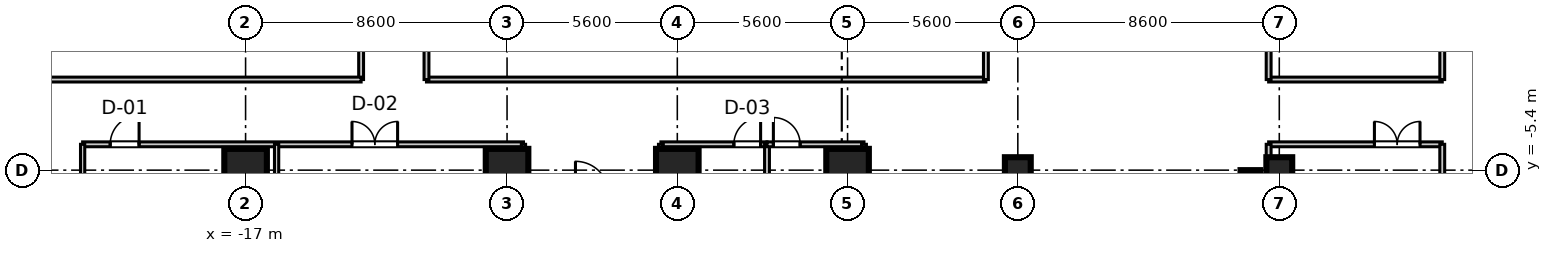
"""IFC4 building model, lengths in metres.
Left out: names, types, materials, properties, quantities, classifications, styles, units other than length and angle.
Written with IfcOpenShell. Run it as: python <this file> out.ifc"""

import sys

from ifc_helpers import new_model, si_unit, direction, frame, frame_2d, origin, origin_2d, place, context, subcontext, project, spatial, rectangle, extrude, source, transform, mapped, element, fill, save


model = new_model("IFC4")
c1 = context("Model", 3, precision=1e-05, world=origin(), true_north=direction((0.0, 1.0)))
c2 = subcontext(c1, "Body", "Model", "MODEL_VIEW")
j1 = project(units=[si_unit("LENGTHUNIT", "METRE"), si_unit("PLANEANGLEUNIT", "RADIAN")], contexts=[c1])
p1 = place(None, origin())
s1 = spatial("IfcSite", under=j1, at=p1, CompositionType="ELEMENT")
p2 = place(p1, origin())
s2 = spatial("IfcBuilding", under=s1, at=p2, CompositionType="ELEMENT")
p3 = place(p2, frame((0.0, 0.0, 39.7)))
s3 = spatial("IfcBuildingStorey", under=s2, at=p3, CompositionType="ELEMENT", Elevation=39.7)
m1 = source(origin(), c2, "Body", "SweptSolid", [
    extrude(rectangle(XDim=1.4, YDim=1.4, at=origin_2d()), origin(), (0.0, 0.0, 1.0), 3.605),
])
for number, where, z_axis, x_axis in (
    (1, (-17.0, -5.4, 0.0), (0.0, 0.0, 1.0), (1.0, 0.0, 0.0)),
    (2, (-8.4, -5.4, 0.0), (0.0, 0.0, 1.0), (1.0, 0.0, 0.0)),
    (3, (-2.8, -5.4, 0.0), (0.0, 0.0, 1.0), (1.0, 0.0, 0.0)),
    (4, (2.8, -5.4, 0.0), (0.0, 0.0, 1.0), (1.0, 0.0, 0.0)),
):
    element("IfcColumn", number, at=place(p3, frame(where, z_axis=z_axis, x_axis=x_axis)), inside=s3, PredefinedType="COLUMN", context=c2, shape_type="MappedRepresentation", body=[
        mapped(m1, transform((0.0, 0.0, 0.0), scale=1.0)),
    ])
m2 = source(origin(), c2, "Body", "SweptSolid", [
    extrude(rectangle(XDim=0.85, YDim=0.85, at=origin_2d()), origin(), (0.0, 0.0, 1.0), 3.605),
])
for number, where, z_axis, x_axis in (
    (5, (8.4, -5.4, 0.0), (0.0, 0.0, 1.0), (1.0, 0.0, 0.0)),
    (6, (17.0, -5.4, 0.0), (0.0, 0.0, 1.0), (1.0, 0.0, 0.0)),
):
    element("IfcColumn", number, at=place(p3, frame(where, z_axis=z_axis, x_axis=x_axis)), inside=s3, PredefinedType="PILASTER", context=c2, shape_type="MappedRepresentation", body=[
        mapped(m2, transform((0.0, 0.0, 0.0), scale=1.0)),
    ])
m3 = source(origin(), c2, "Body", "SweptSolid", [
    extrude(rectangle(XDim=11.6, YDim=0.65, at=frame_2d((5.8, 0.0))), origin(), (0.0, 0.0, 1.0), 3.37),
])
p4 = place(p3, frame((16.05, -17.0, 0.0), z_axis=(0.0, 0.0, 1.0), x_axis=(0.0, 1.0, 0.0)))
e7 = element("IfcWall", 7, at=p4, inside=s3, PredefinedType="SHEAR", context=c2, shape_type="MappedRepresentation", body=[
    mapped(m3, transform((0.0, 0.0, 0.0), scale=1.0)),
])
m4 = source(origin(), c2, "Body", "SweptSolid", [
    extrude(rectangle(XDim=5.71, YDim=0.16, at=frame_2d((2.855, 0.0))), origin(), (0.0, 0.0, 1.0), 2.71),
])
p5 = place(p3, frame((16.65, -4.55, 0.0), z_axis=(0.0, 0.0, 1.0), x_axis=(1.0, 0.0, 0.0)))
e8 = element("IfcWall", 8, at=p5, inside=s3, PredefinedType="PARTITIONING", context=c2, shape_type="MappedRepresentation", body=[
    mapped(m4, transform((0.0, 0.0, 0.0), scale=1.0)),
])
p6 = place(p5, frame((3.479, 0.0, 0.0)))
e9 = element("IfcOpeningElement", 9, at=p6, cuts=e8, PredefinedType="OPENING", context=c2, shape_type="SweptSolid", body=[
    extrude(rectangle(XDim=1.5, YDim=2.15, at=frame_2d((0.75, 1.075))), frame((0.0, 0.09, 0.0), z_axis=(0.0, -1.0, 0.0), x_axis=(1.0, 0.0, 0.0)), (0.0, 0.0, 1.0), 0.18),
])
m5 = source(origin(), c2, "Body", "SweptSolid", [
    extrude(rectangle(XDim=20.55, YDim=0.16, at=frame_2d((10.275, 0.0))), origin(), (0.0, 0.0, 1.0), 2.71),
])
p7 = place(p3, frame((16.65, -25.1, 0.0), z_axis=(0.0, 0.0, 1.0), x_axis=(0.0, 1.0, 0.0)))
e10 = element("IfcWall", 10, at=p7, inside=s3, PredefinedType="PARTITIONING", context=c2, shape_type="MappedRepresentation", body=[
    mapped(m5, transform((0.0, 0.0, 0.0), scale=1.0)),
])
m6 = source(origin(), c2, "Body", "SweptSolid", [
    extrude(rectangle(XDim=19.13, YDim=0.16, at=frame_2d((9.565, 0.0))), origin(), (0.0, 0.0, 1.0), 2.71),
])
p8 = place(p3, frame((22.36, -23.68, 0.0), z_axis=(0.0, 0.0, 1.0), x_axis=(0.0, 1.0, 0.0)))
e11 = element("IfcWall", 11, at=p8, inside=s3, PredefinedType="PARTITIONING", context=c2, shape_type="MappedRepresentation", body=[
    mapped(m6, transform((0.0, 0.0, 0.0), scale=1.0)),
])
m7 = source(origin(), c2, "Body", "SweptSolid", [
    extrude(rectangle(XDim=14.5, YDim=0.16, at=frame_2d((7.25, 0.0))), origin(), (0.0, 0.0, 1.0), 2.71),
])
p9 = place(p3, frame((-22.36, -4.55, 0.0), z_axis=(0.0, 0.0, 1.0), x_axis=(1.0, 0.0, 0.0)))
e12 = element("IfcWall", 12, at=p9, inside=s3, PredefinedType="PARTITIONING", context=c2, shape_type="MappedRepresentation", body=[
    mapped(m7, transform((0.0, 0.0, 0.0), scale=1.0)),
])
p10 = place(p9, frame((0.907, 0.0, 0.0)))
e13 = element("IfcOpeningElement", 13, at=p10, cuts=e12, PredefinedType="OPENING", context=c2, shape_type="SweptSolid", body=[
    extrude(rectangle(XDim=0.95, YDim=2.1, at=frame_2d((0.475, 1.05))), frame((0.0, 0.09, 0.0), z_axis=(0.0, -1.0, 0.0), x_axis=(1.0, 0.0, 0.0)), (0.0, 0.0, 1.0), 0.18),
])
p11 = place(p9, frame((8.86, 0.0, 0.0)))
e14 = element("IfcOpeningElement", 14, at=p11, cuts=e12, PredefinedType="OPENING", context=c2, shape_type="SweptSolid", body=[
    extrude(rectangle(XDim=1.5, YDim=2.15, at=frame_2d((0.75, 1.075))), frame((0.0, 0.09, 0.0), z_axis=(0.0, -1.0, 0.0), x_axis=(1.0, 0.0, 0.0)), (0.0, 0.0, 1.0), 0.18),
])
m8 = source(origin(), c2, "Body", "SweptSolid", [
    extrude(rectangle(XDim=19.13, YDim=0.14, at=frame_2d((9.565, 0.0))), origin(), (0.0, 0.0, 1.0), 2.71),
])
p12 = place(p3, frame((-22.36, -23.68, 0.0), z_axis=(0.0, 0.0, 1.0), x_axis=(0.0, 1.0, 0.0)))
e15 = element("IfcWall", 15, at=p12, inside=s3, PredefinedType="PARTITIONING", context=c2, shape_type="MappedRepresentation", body=[
    mapped(m8, transform((0.0, 0.0, 0.0), scale=1.0)),
])
m9 = source(origin(), c2, "Body", "SweptSolid", [
    extrude(rectangle(XDim=20.55, YDim=0.14, at=frame_2d((10.275, 0.0))), origin(), (0.0, 0.0, 1.0), 2.71),
])
for number, where, z_axis, x_axis in (
    (16, (-7.86, -25.1, 0.0), (0.0, 0.0, 1.0), (0.0, 1.0, 0.0)),
    (17, (-15.98, -25.1, 0.0), (0.0, 0.0, 1.0), (0.0, 1.0, 0.0)),
):
    element("IfcWall", number, at=place(p3, frame(where, z_axis=z_axis, x_axis=x_axis)), inside=s3, PredefinedType="PARTITIONING", context=c2, shape_type="MappedRepresentation", body=[
        mapped(m9, transform((0.0, 0.0, 0.0), scale=1.0)),
    ])
m10 = source(origin(), c2, "Body", "SweptSolid", [
    extrude(rectangle(XDim=3.49, YDim=0.16, at=frame_2d((1.745, 0.0))), origin(), (0.0, 0.0, 1.0), 2.71),
])
p13 = place(p3, frame((-3.34, -4.55, 0.0), z_axis=(0.0, 0.0, 1.0), x_axis=(1.0, 0.0, 0.0)))
e18 = element("IfcWall", 18, at=p13, inside=s3, PredefinedType="PARTITIONING", context=c2, shape_type="MappedRepresentation", body=[
    mapped(m10, transform((0.0, 0.0, 0.0), scale=1.0)),
])
p14 = place(p13, frame((2.4, 0.0, 0.0)))
e19 = element("IfcOpeningElement", 19, at=p14, cuts=e18, PredefinedType="OPENING", context=c2, shape_type="SweptSolid", body=[
    extrude(rectangle(XDim=0.88, YDim=2.1, at=frame_2d((0.44, 1.05))), frame((0.0, 0.09, 0.0), z_axis=(0.0, -1.0, 0.0), x_axis=(1.0, 0.0, 0.0)), (0.0, 0.0, 1.0), 0.18),
])
for number, where, z_axis, x_axis in (
    (20, (-3.34, -25.1, 0.0), (0.0, 0.0, 1.0), (0.0, 1.0, 0.0)),
    (21, (0.15, -25.1, 0.0), (0.0, 0.0, 1.0), (0.0, 1.0, 0.0)),
):
    element("IfcWall", number, at=place(p3, frame(where, z_axis=z_axis, x_axis=x_axis)), inside=s3, PredefinedType="PARTITIONING", context=c2, shape_type="MappedRepresentation", body=[
        mapped(m5, transform((0.0, 0.0, 0.0), scale=1.0)),
    ])
m11 = source(origin(), c2, "Body", "SweptSolid", [
    extrude(rectangle(XDim=3.19, YDim=0.16, at=frame_2d((1.595, 0.0))), origin(), (0.0, 0.0, 1.0), 2.71),
])
p15 = place(p3, frame((0.15, -4.55, 0.0), z_axis=(0.0, 0.0, 1.0), x_axis=(1.0, 0.0, 0.0)))
e22 = element("IfcWall", 22, at=p15, inside=s3, PredefinedType="PARTITIONING", context=c2, shape_type="MappedRepresentation", body=[
    mapped(m11, transform((0.0, 0.0, 0.0), scale=1.0)),
])
p16 = place(p15, frame((0.21, 0.0, 0.0)))
e23 = element("IfcOpeningElement", 23, at=p16, cuts=e22, PredefinedType="OPENING", context=c2, shape_type="SweptSolid", body=[
    extrude(rectangle(XDim=0.88, YDim=2.1, at=frame_2d((0.44, 1.05))), frame((0.0, 0.09, 0.0), z_axis=(0.0, -1.0, 0.0), x_axis=(1.0, 0.0, 0.0)), (0.0, 0.0, 1.0), 0.18),
])
p17 = place(p3, frame((3.34, -25.1, 0.0), z_axis=(0.0, 0.0, 1.0), x_axis=(0.0, 1.0, 0.0)))
e24 = element("IfcWall", 24, at=p17, inside=s3, PredefinedType="PARTITIONING", context=c2, shape_type="MappedRepresentation", body=[
    mapped(m5, transform((0.0, 0.0, 0.0), scale=1.0)),
])
m12 = source(origin(), c2, "Body", "SweptSolid", [
    extrude(rectangle(XDim=4.84, YDim=0.16, at=frame_2d((2.42, 0.0))), origin(), (0.0, 0.0, 1.0), 2.71),
])
p18 = place(p3, frame((-13.2, -2.42, 0.0), z_axis=(0.0, 0.0, 1.0), x_axis=(0.0, 1.0, 0.0)))
e25 = element("IfcWall", 25, at=p18, inside=s3, PredefinedType="PARTITIONING", context=c2, shape_type="MappedRepresentation", body=[
    mapped(m12, transform((0.0, 0.0, 0.0), scale=1.0)),
])
m13 = source(origin(), c2, "Body", "SweptSolid", [
    extrude(rectangle(XDim=11.9, YDim=0.16, at=frame_2d((5.95, 0.0))), origin(), (0.0, 0.0, 1.0), 2.71),
])
p19 = place(p3, frame((-25.1, -2.42, 0.0), z_axis=(0.0, 0.0, 1.0), x_axis=(1.0, 0.0, 0.0)))
e26 = element("IfcWall", 26, at=p19, inside=s3, PredefinedType="PARTITIONING", context=c2, shape_type="MappedRepresentation", body=[
    mapped(m13, transform((0.0, 0.0, 0.0), scale=1.0)),
])
m14 = source(origin(), c2, "Body", "SweptSolid", [
    extrude(rectangle(XDim=18.4, YDim=0.16, at=frame_2d((9.2, 0.0))), origin(), (0.0, 0.0, 1.0), 2.71),
])
p20 = place(p3, frame((-11.05, -2.42, 0.0), z_axis=(0.0, 0.0, 1.0), x_axis=(1.0, 0.0, 0.0)))
e27 = element("IfcWall", 27, at=p20, inside=s3, PredefinedType="PARTITIONING", context=c2, shape_type="MappedRepresentation", body=[
    mapped(m14, transform((0.0, 0.0, 0.0), scale=1.0)),
])
for number, where, z_axis, x_axis in (
    (28, (-11.05, -2.42, 0.0), (0.0, 0.0, 1.0), (0.0, 1.0, 0.0)),
    (29, (7.35, -2.42, 0.0), (0.0, 0.0, 1.0), (0.0, 1.0, 0.0)),
):
    element("IfcWall", number, at=place(p3, frame(where, z_axis=z_axis, x_axis=x_axis)), inside=s3, PredefinedType="PARTITIONING", context=c2, shape_type="MappedRepresentation", body=[
        mapped(m12, transform((0.0, 0.0, 0.0), scale=1.0)),
    ])
p21 = place(p3, frame((16.65, -2.42, 0.0), z_axis=(0.0, 0.0, 1.0), x_axis=(1.0, 0.0, 0.0)))
e30 = element("IfcWall", 30, at=p21, inside=s3, PredefinedType="PARTITIONING", context=c2, shape_type="MappedRepresentation", body=[
    mapped(m4, transform((0.0, 0.0, 0.0), scale=1.0)),
])
for number, where, z_axis, x_axis in (
    (31, (16.65, -2.42, 0.0), (0.0, 0.0, 1.0), (0.0, 1.0, 0.0)),
    (32, (22.36, -2.42, 0.0), (0.0, 0.0, 1.0), (0.0, 1.0, 0.0)),
):
    element("IfcWall", number, at=place(p3, frame(where, z_axis=z_axis, x_axis=x_axis)), inside=s3, PredefinedType="PARTITIONING", context=c2, shape_type="MappedRepresentation", body=[
        mapped(m12, transform((0.0, 0.0, 0.0), scale=1.0)),
    ])
m15 = source(origin(), c2, "Body", "SweptSolid", [
    extrude(rectangle(XDim=1.5, YDim=2.15, at=frame_2d((0.75, 1.075))), frame((0.0, 0.025, 0.0), z_axis=(0.0, -1.0, 0.0), x_axis=(1.0, 0.0, 0.0)), (0.0, 0.0, 1.0), 0.05),
])
p22 = place(p6, frame((1.5, 0.0, 0.0), z_axis=(0.0, 0.0, 1.0), x_axis=(-1.0, 0.0, 0.0)))
e33 = element("IfcDoor", 33, at=p22, inside=s3, OperationType="DOUBLE_DOOR_SINGLE_SWING", PredefinedType="DOOR", context=c2, shape_type="MappedRepresentation", body=[
    mapped(m15, transform((0.0, 0.0, 0.0), scale=1.0)),
])
fill(e9, e33)
m16 = source(origin(), c2, "Body", "SweptSolid", [
    extrude(rectangle(XDim=0.95, YDim=2.1, at=frame_2d((0.475, 1.05))), frame((0.0, 0.025, 0.0), z_axis=(0.0, -1.0, 0.0), x_axis=(1.0, 0.0, 0.0)), (0.0, 0.0, 1.0), 0.05),
])
p23 = place(p10, frame((0.95, 0.0, 0.0), z_axis=(0.0, 0.0, 1.0), x_axis=(-1.0, 0.0, 0.0)))
e34 = element("IfcDoor", 34, at=p23, inside=s3, OperationType="SINGLE_SWING_RIGHT", PredefinedType="DOOR", context=c2, shape_type="MappedRepresentation", body=[
    mapped(m16, transform((0.0, 0.0, 0.0), scale=1.0)),
])
fill(e13, e34)
p24 = place(p11, frame((1.5, 0.0, 0.0), z_axis=(0.0, 0.0, 1.0), x_axis=(-1.0, 0.0, 0.0)))
e35 = element("IfcDoor", 35, at=p24, inside=s3, OperationType="DOUBLE_DOOR_SINGLE_SWING", PredefinedType="DOOR", context=c2, shape_type="MappedRepresentation", body=[
    mapped(m15, transform((0.0, 0.0, 0.0), scale=1.0)),
])
fill(e14, e35)
m17 = source(origin(), c2, "Body", "SweptSolid", [
    extrude(rectangle(XDim=0.88, YDim=2.1, at=frame_2d((0.44, 1.05))), frame((0.0, 0.025, 0.0), z_axis=(0.0, -1.0, 0.0), x_axis=(1.0, 0.0, 0.0)), (0.0, 0.0, 1.0), 0.05),
])
p25 = place(p14, frame((0.88, 0.0, 0.0), z_axis=(0.0, 0.0, 1.0), x_axis=(-1.0, 0.0, 0.0)))
e36 = element("IfcDoor", 36, at=p25, inside=s3, OperationType="SINGLE_SWING_RIGHT", PredefinedType="DOOR", context=c2, shape_type="MappedRepresentation", body=[
    mapped(m17, transform((0.0, 0.0, 0.0), scale=1.0)),
])
fill(e19, e36)
p26 = place(p16, frame((0.88, 0.0, 0.0), z_axis=(0.0, 0.0, 1.0), x_axis=(-1.0, 0.0, 0.0)))
e37 = element("IfcDoor", 37, at=p26, inside=s3, OperationType="SINGLE_SWING_LEFT", PredefinedType="DOOR", context=c2, shape_type="MappedRepresentation", body=[
    mapped(m17, transform((0.0, 0.0, 0.0), scale=1.0)),
])
fill(e23, e37)
save(model, sys.argv[1])
